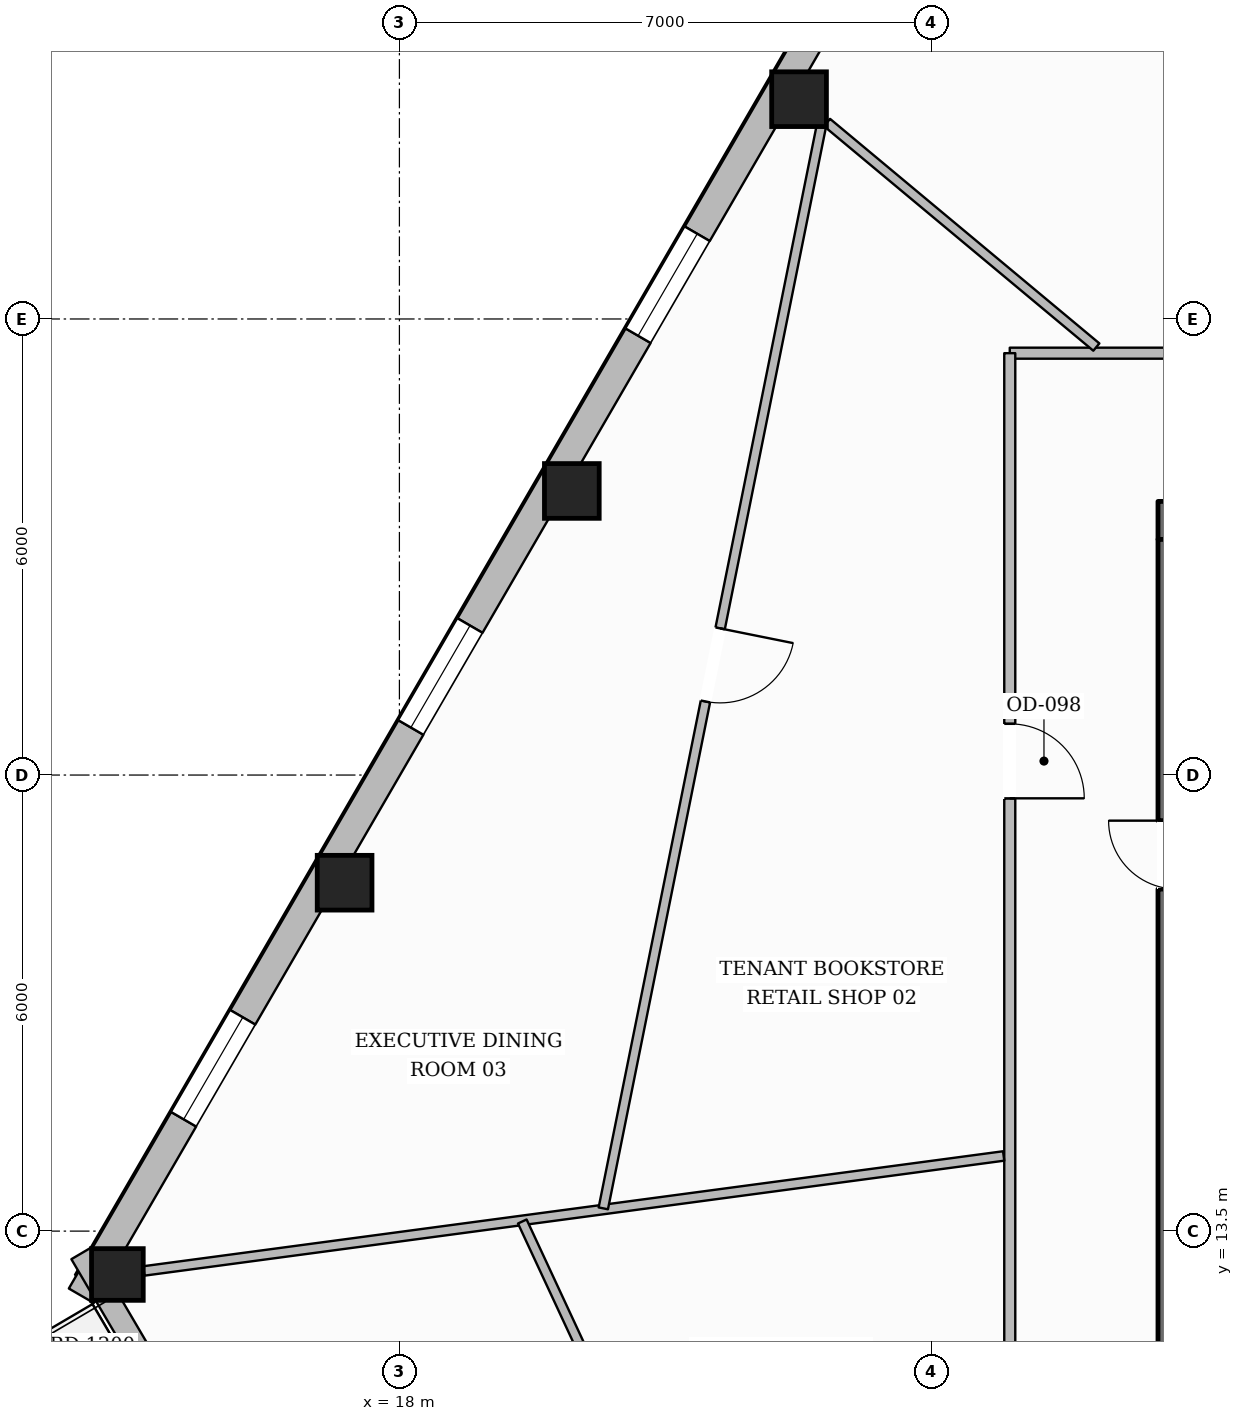
"""IFC4 building model, lengths in metres.
Left out: names, types, materials, properties, quantities, classifications, styles, units other than length and angle.
Written with IfcOpenShell. Run it as: python <this file> out.ifc"""

import sys

from ifc_helpers import new_model, si_unit, direction, frame, frame_2d, origin, origin_2d, place, context, subcontext, project, spatial, rectangle, hollow_rectangle, extrude, element, fill, save


model = new_model("IFC4")
c1 = context("Model", 3, precision=1e-05, world=origin(), true_north=direction((0.0, 1.0)))
c2 = subcontext(c1, "Body", "Model", "MODEL_VIEW")
j1 = project(units=[si_unit("LENGTHUNIT", "METRE"), si_unit("PLANEANGLEUNIT", "RADIAN")], contexts=[c1])
p1 = place(None, origin())
s1 = spatial("IfcSite", under=j1, at=p1, CompositionType="ELEMENT")
p2 = place(p1, origin())
s2 = spatial("IfcBuilding", under=s1, at=p2, CompositionType="ELEMENT")
p3 = place(p2, frame((0.0, 0.0, 124.0)))
s3 = spatial("IfcBuildingStorey", under=s2, at=p3, CompositionType="ELEMENT", Elevation=124.0)
p4 = place(p3, frame((27.98, 22.85, 0.0), z_axis=(0.0, 0.0, 1.0), x_axis=(1.0, 0.0, 0.0)))
e1 = element("IfcWall", 1, at=p4, inside=s3, PredefinedType="SOLIDWALL", context=c2, shape_type="SweptSolid", body=[
    extrude(rectangle(XDim=20.04, YDim=0.5, at=frame_2d((10.02, 0.0))), origin(), (0.0, 0.0, 1.0), 3.6),
])
p5 = place(p4, frame((6.295, 0.0, 0.0)))
e2 = element("IfcOpeningElement", 2, at=p5, cuts=e1, PredefinedType="OPENING", context=c2, shape_type="SweptSolid", body=[
    extrude(rectangle(XDim=1.05, YDim=2.15, at=frame_2d((0.525, 1.075))), frame((0.0, 0.26, 0.0), z_axis=(0.0, -1.0, 0.0), x_axis=(1.0, 0.0, 0.0)), (0.0, 0.0, 1.0), 0.52),
])
p6 = place(p4, frame((12.695, 0.0, 0.0)))
e3 = element("IfcOpeningElement", 3, at=p6, cuts=e1, PredefinedType="OPENING", context=c2, shape_type="SweptSolid", body=[
    extrude(rectangle(XDim=1.05, YDim=2.15, at=frame_2d((0.525, 1.075))), frame((0.0, 0.26, 0.0), z_axis=(0.0, -1.0, 0.0), x_axis=(1.0, 0.0, 0.0)), (0.0, 0.0, 1.0), 0.52),
])
p7 = place(p3, frame((28.23, 9.6, 0.0), z_axis=(0.0, 0.0, 1.0), x_axis=(0.0, 1.0, 0.0)))
e4 = element("IfcWall", 4, at=p7, inside=s3, PredefinedType="SOLIDWALL", context=c2, shape_type="SweptSolid", body=[
    extrude(rectangle(XDim=13.0, YDim=0.5, at=frame_2d((6.5, 0.0))), origin(), (0.0, 0.0, 1.0), 3.6),
])
p8 = place(p7, frame((0.2, 0.0, 0.0)))
e5 = element("IfcOpeningElement", 5, at=p8, cuts=e4, PredefinedType="OPENING", context=c2, shape_type="SweptSolid", body=[
    extrude(rectangle(XDim=1.1, YDim=2.15, at=frame_2d((0.55, 1.075))), frame((0.0, 0.26, 0.0), z_axis=(0.0, -1.0, 0.0), x_axis=(1.0, 0.0, 0.0)), (0.0, 0.0, 1.0), 0.52),
])
p9 = place(p7, frame((8.4, 0.0, 0.0)))
e6 = element("IfcOpeningElement", 6, at=p9, cuts=e4, PredefinedType="OPENING", context=c2, shape_type="SweptSolid", body=[
    extrude(rectangle(XDim=0.9, YDim=2.1, at=frame_2d((0.45, 1.05))), frame((0.0, 0.26, 0.0), z_axis=(0.0, -1.0, 0.0), x_axis=(1.0, 0.0, 0.0)), (0.0, 0.0, 1.0), 0.52),
])
for number, where, z_axis, x_axis in (
    (7, (23.258, 28.392, 0.0), (0.0, 0.0, 1.0), (1.0, 0.0, 0.0)),
    (8, (20.268, 23.238, 0.0), (0.0, 0.0, 1.0), (1.0, 0.0, 0.0)),
    (9, (17.279, 18.083, 0.0), (0.0, 0.0, 1.0), (1.0, 0.0, 0.0)),
):
    element("IfcColumn", number, at=place(p3, frame(where, z_axis=z_axis, x_axis=x_axis)), inside=s3, PredefinedType="COLUMN", context=c2, shape_type="SweptSolid", body=[
        extrude(hollow_rectangle(XDim=0.72, YDim=0.72, WallThickness=0.032, at=origin_2d()), origin(), (0.0, 0.0, 1.0), 3.6),
    ])
p10 = place(p3, frame((14.29, 12.929, 0.0), z_axis=(0.0, 0.0, 1.0), x_axis=(1.0, 0.0, 0.0)))
e10 = element("IfcColumn", 10, at=p10, inside=s3, PredefinedType="COLUMN", context=c2, shape_type="SweptSolid", body=[
    extrude(hollow_rectangle(XDim=0.68, YDim=0.68, WallThickness=0.03, at=origin_2d()), origin(), (0.0, 0.0, 1.0), 3.6),
])
p11 = place(p3, frame((13.815, 12.649, 0.0), z_axis=(0.0, 0.0, 1.0), x_axis=(0.501718288841, 0.865031073801, 0.0)))
e11 = element("IfcWall", 11, at=p11, inside=s3, PredefinedType="STANDARD", context=c2, shape_type="SweptSolid", body=[
    extrude(rectangle(XDim=36.708, YDim=0.38, at=frame_2d((18.354, 0.0))), origin(), (0.0, 0.0, 1.0), 3.059),
])
p12 = place(p11, frame((32.476, 0.0, 0.65)))
e12 = element("IfcOpeningElement", 12, at=p12, cuts=e11, PredefinedType="OPENING", context=c2, shape_type="SweptSolid", body=[
    extrude(rectangle(XDim=1.55, YDim=1.75, at=frame_2d((0.775, 0.875))), frame((0.0, 0.2, 0.0), z_axis=(0.0, -1.0, 0.0), x_axis=(1.0, 0.0, 0.0)), (0.0, 0.0, 1.0), 0.4),
])
p13 = place(p11, frame((26.517, 0.0, 0.65)))
e13 = element("IfcOpeningElement", 13, at=p13, cuts=e11, PredefinedType="OPENING", context=c2, shape_type="SweptSolid", body=[
    extrude(rectangle(XDim=1.55, YDim=1.75, at=frame_2d((0.775, 0.875))), frame((0.0, 0.2, 0.0), z_axis=(0.0, -1.0, 0.0), x_axis=(1.0, 0.0, 0.0)), (0.0, 0.0, 1.0), 0.4),
])
p14 = place(p11, frame((14.601, 0.0, 0.65)))
e14 = element("IfcOpeningElement", 14, at=p14, cuts=e11, PredefinedType="OPENING", context=c2, shape_type="SweptSolid", body=[
    extrude(rectangle(XDim=1.55, YDim=1.75, at=frame_2d((0.775, 0.875))), frame((0.0, 0.2, 0.0), z_axis=(0.0, -1.0, 0.0), x_axis=(1.0, 0.0, 0.0)), (0.0, 0.0, 1.0), 0.4),
])
p15 = place(p11, frame((8.643, 0.0, 0.65)))
e15 = element("IfcOpeningElement", 15, at=p15, cuts=e11, PredefinedType="OPENING", context=c2, shape_type="SweptSolid", body=[
    extrude(rectangle(XDim=1.55, YDim=1.75, at=frame_2d((0.775, 0.875))), frame((0.0, 0.2, 0.0), z_axis=(0.0, -1.0, 0.0), x_axis=(1.0, 0.0, 0.0)), (0.0, 0.0, 1.0), 0.4),
])
p16 = place(p11, frame((2.684, 0.0, 0.65)))
e16 = element("IfcOpeningElement", 16, at=p16, cuts=e11, PredefinedType="OPENING", context=c2, shape_type="SweptSolid", body=[
    extrude(rectangle(XDim=1.55, YDim=1.75, at=frame_2d((0.775, 0.875))), frame((0.0, 0.2, 0.0), z_axis=(0.0, -1.0, 0.0), x_axis=(1.0, 0.0, 0.0)), (0.0, 0.0, 1.0), 0.4),
])
p17 = place(p3, frame((20.179, 2.366, 0.0), z_axis=(0.0, 0.0, 1.0), x_axis=(-0.506333382152, 0.862337814385, 0.0)))
e17 = element("IfcWall", 17, at=p17, inside=s3, PredefinedType="STANDARD", context=c2, shape_type="SweptSolid", body=[
    extrude(rectangle(XDim=12.572, YDim=0.3, at=frame_2d((6.286, 0.0))), origin(), (0.0, 0.0, 1.0), 3.059),
])
p18 = place(p17, frame((5.711, 0.0, 0.0)))
e18 = element("IfcOpeningElement", 18, at=p18, cuts=e17, PredefinedType="OPENING", context=c2, shape_type="SweptSolid", body=[
    extrude(rectangle(XDim=1.15, YDim=2.2, at=frame_2d((0.575, 1.1))), frame((0.0, 0.16, 0.0), z_axis=(0.0, -1.0, 0.0), x_axis=(1.0, 0.0, 0.0)), (0.0, 0.0, 1.0), 0.32),
])
p19 = place(p3, frame((49.97, 25.05, 0.0), z_axis=(0.0, 0.0, 1.0), x_axis=(-1.0, 0.0, 0.0)))
e19 = element("IfcWall", 19, at=p19, inside=s3, PredefinedType="PARTITIONING", context=c2, shape_type="SweptSolid", body=[
    extrude(rectangle(XDim=23.94, YDim=0.145, at=frame_2d((11.97, 0.0))), origin(), (0.0, 0.0, 1.0), 3.6),
])
p20 = place(p19, frame((14.53, 0.0, 0.0)))
e20 = element("IfcOpeningElement", 20, at=p20, cuts=e19, PredefinedType="OPENING", context=c2, shape_type="SweptSolid", body=[
    extrude(rectangle(XDim=0.88, YDim=2.1, at=frame_2d((0.44, 1.05))), frame((0.0, 0.083, 0.0), z_axis=(0.0, -1.0, 0.0), x_axis=(1.0, 0.0, 0.0)), (0.0, 0.0, 1.0), 0.165),
])
p21 = place(p19, frame((12.01, 0.0, 0.0)))
e21 = element("IfcOpeningElement", 21, at=p21, cuts=e19, PredefinedType="OPENING", context=c2, shape_type="SweptSolid", body=[
    extrude(rectangle(XDim=0.88, YDim=2.1, at=frame_2d((0.44, 1.05))), frame((0.0, 0.083, 0.0), z_axis=(0.0, -1.0, 0.0), x_axis=(1.0, 0.0, 0.0)), (0.0, 0.0, 1.0), 0.165),
])
p22 = place(p19, frame((9.55, 0.0, 0.0)))
e22 = element("IfcOpeningElement", 22, at=p22, cuts=e19, PredefinedType="OPENING", context=c2, shape_type="SweptSolid", body=[
    extrude(rectangle(XDim=0.96, YDim=2.1, at=frame_2d((0.48, 1.05))), frame((0.0, 0.083, 0.0), z_axis=(0.0, -1.0, 0.0), x_axis=(1.0, 0.0, 0.0)), (0.0, 0.0, 1.0), 0.165),
])
p23 = place(p19, frame((3.826, 0.0, 0.0)))
e23 = element("IfcOpeningElement", 23, at=p23, cuts=e19, PredefinedType="OPENING", context=c2, shape_type="SweptSolid", body=[
    extrude(rectangle(XDim=1.4, YDim=2.2, at=frame_2d((0.7, 1.1))), frame((0.0, 0.083, 0.0), z_axis=(0.0, -1.0, 0.0), x_axis=(1.0, 0.0, 0.0)), (0.0, 0.0, 1.0), 0.165),
])
p24 = place(p3, frame((26.03, 25.05, 0.0), z_axis=(0.0, 0.0, 1.0), x_axis=(0.0, -1.0, 0.0)))
e24 = element("IfcWall", 24, at=p24, inside=s3, PredefinedType="PARTITIONING", context=c2, shape_type="SweptSolid", body=[
    extrude(rectangle(XDim=17.9, YDim=0.145, at=frame_2d((8.95, 0.0))), origin(), (0.0, 0.0, 1.0), 3.288),
])
p25 = place(p24, frame((4.876, 0.0, 0.0)))
e25 = element("IfcOpeningElement", 25, at=p25, cuts=e24, PredefinedType="OPENING", context=c2, shape_type="SweptSolid", body=[
    extrude(rectangle(XDim=0.98, YDim=2.15, at=frame_2d((0.49, 1.075))), frame((0.0, 0.083, 0.0), z_axis=(0.0, -1.0, 0.0), x_axis=(1.0, 0.0, 0.0)), (0.0, 0.0, 1.0), 0.165),
])
p26 = place(p24, frame((13.656, 0.0, 0.0)))
e26 = element("IfcOpeningElement", 26, at=p26, cuts=e24, PredefinedType="OPENING", context=c2, shape_type="SweptSolid", body=[
    extrude(rectangle(XDim=0.98, YDim=2.15, at=frame_2d((0.49, 1.075))), frame((0.0, 0.083, 0.0), z_axis=(0.0, -1.0, 0.0), x_axis=(1.0, 0.0, 0.0)), (0.0, 0.0, 1.0), 0.165),
])
p27 = place(p3, frame((27.169, 25.131, 0.0), z_axis=(0.0, 0.0, 1.0), x_axis=(-0.768091130842, 0.640340545899, 0.0)))
e27 = element("IfcWall", 27, at=p27, inside=s3, PredefinedType="PARTITIONING", context=c2, shape_type="SweptSolid", body=[
    extrude(rectangle(XDim=4.613, YDim=0.125, at=frame_2d((2.307, 0.0))), origin(), (0.0, 0.0, 1.0), 3.141),
])
p28 = place(p3, frame((25.949, 14.489, 0.0), z_axis=(0.0, 0.0, 1.0), x_axis=(-0.991176633898, -0.132547653371, 0.0)))
e28 = element("IfcWall", 28, at=p28, inside=s3, PredefinedType="PARTITIONING", context=c2, shape_type="SweptSolid", body=[
    extrude(rectangle(XDim=11.412, YDim=0.125, at=frame_2d((5.706, 0.0))), origin(), (0.0, 0.0, 1.0), 3.141),
])
p29 = place(p3, frame((23.548, 28.024, 0.0), z_axis=(0.0, 0.0, 1.0), x_axis=(-0.197497571842, -0.980303376061, 0.0)))
e29 = element("IfcWall", 29, at=p29, inside=s3, PredefinedType="PARTITIONING", context=c2, shape_type="SweptSolid", body=[
    extrude(rectangle(XDim=14.51, YDim=0.125, at=frame_2d((7.255, 0.0))), origin(), (0.0, 0.0, 1.0), 3.288),
])
p30 = place(p29, frame((6.727, 0.0, 0.0)))
e30 = element("IfcOpeningElement", 30, at=p30, cuts=e29, PredefinedType="OPENING", context=c2, shape_type="SweptSolid", body=[
    extrude(rectangle(XDim=0.98, YDim=2.15, at=frame_2d((0.49, 1.075))), frame((0.0, 0.073, 0.0), z_axis=(0.0, -1.0, 0.0), x_axis=(1.0, 0.0, 0.0)), (0.0, 0.0, 1.0), 0.145),
])
p31 = place(p3, frame((19.617, 13.627, 0.0), z_axis=(0.0, 0.0, 1.0), x_axis=(0.421978172628, -0.906605990398, 0.0)))
e31 = element("IfcWall", 31, at=p31, inside=s3, PredefinedType="PARTITIONING", context=c2, shape_type="SweptSolid", body=[
    extrude(rectangle(XDim=11.979, YDim=0.125, at=frame_2d((5.99, 0.0))), origin(), (0.0, 0.0, 1.0), 3.6),
])
p32 = place(p31, frame((5.608, 0.0, 0.0)))
e32 = element("IfcOpeningElement", 32, at=p32, cuts=e31, PredefinedType="OPENING", context=c2, shape_type="SweptSolid", body=[
    extrude(rectangle(XDim=0.98, YDim=2.15, at=frame_2d((0.49, 1.075))), frame((0.0, 0.073, 0.0), z_axis=(0.0, -1.0, 0.0), x_axis=(1.0, 0.0, 0.0)), (0.0, 0.0, 1.0), 0.145),
])
p33 = place(p14, origin())
e33 = element("IfcWindow", 33, at=p33, inside=s3, PartitioningType="SINGLE_PANEL", PredefinedType="WINDOW", context=c2, shape_type="SweptSolid", body=[
    extrude(rectangle(XDim=1.55, YDim=1.75, at=frame_2d((0.775, 0.875))), frame((0.0, 0.03, 0.0), z_axis=(0.0, -1.0, 0.0), x_axis=(1.0, 0.0, 0.0)), (0.0, 0.0, 1.0), 0.06),
])
fill(e14, e33)
p34 = place(p15, origin())
e34 = element("IfcWindow", 34, at=p34, inside=s3, PartitioningType="SINGLE_PANEL", PredefinedType="WINDOW", context=c2, shape_type="SweptSolid", body=[
    extrude(rectangle(XDim=1.55, YDim=1.75, at=frame_2d((0.775, 0.875))), frame((0.0, 0.03, 0.0), z_axis=(0.0, -1.0, 0.0), x_axis=(1.0, 0.0, 0.0)), (0.0, 0.0, 1.0), 0.06),
])
fill(e15, e34)
p35 = place(p16, origin())
e35 = element("IfcWindow", 35, at=p35, inside=s3, PartitioningType="SINGLE_PANEL", PredefinedType="WINDOW", context=c2, shape_type="SweptSolid", body=[
    extrude(rectangle(XDim=1.55, YDim=1.75, at=frame_2d((0.775, 0.875))), frame((0.0, 0.03, 0.0), z_axis=(0.0, -1.0, 0.0), x_axis=(1.0, 0.0, 0.0)), (0.0, 0.0, 1.0), 0.06),
])
fill(e16, e35)
p36 = place(p25, origin())
e36 = element("IfcDoor", 36, at=p36, inside=s3, OperationType="SINGLE_SWING_RIGHT", PredefinedType="DOOR", context=c2, shape_type="SweptSolid", body=[
    extrude(rectangle(XDim=0.98, YDim=2.15, at=frame_2d((0.49, 1.075))), frame((0.0, 0.025, 0.0), z_axis=(0.0, -1.0, 0.0), x_axis=(1.0, 0.0, 0.0)), (0.0, 0.0, 1.0), 0.05),
])
fill(e25, e36)
p37 = place(p30, origin())
e37 = element("IfcDoor", 37, at=p37, inside=s3, OperationType="SINGLE_SWING_LEFT", PredefinedType="DOOR", context=c2, shape_type="SweptSolid", body=[
    extrude(rectangle(XDim=0.98, YDim=2.15, at=frame_2d((0.49, 1.075))), frame((0.0, 0.025, 0.0), z_axis=(0.0, -1.0, 0.0), x_axis=(1.0, 0.0, 0.0)), (0.0, 0.0, 1.0), 0.05),
])
fill(e30, e37)
save(model, sys.argv[1])
